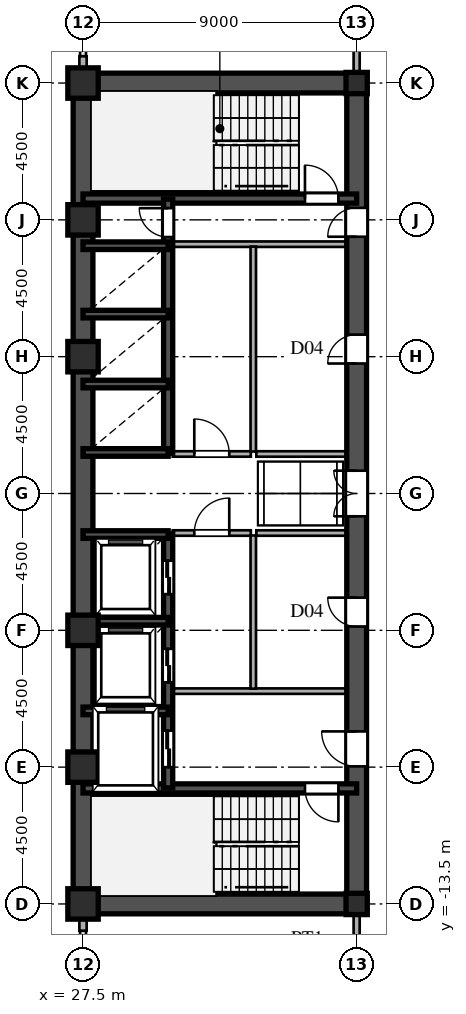
"""IFC4 building model, lengths in metres.
Left out: names, types, materials, properties, quantities, classifications, styles, units other than length and angle.
Written with IfcOpenShell. Run it as: python <this file> out.ifc"""

import sys

from ifc_helpers import new_model, si_unit, direction, frame, frame_2d, origin, origin_2d, place, context, subcontext, project, spatial, rectangle, hollow_rectangle, i_section, extrude, source, transform, mapped, element, fill, save


model = new_model("IFC4")
c1 = context("Model", 3, precision=1e-05, world=origin(), true_north=direction((0.0, 1.0)))
c2 = subcontext(c1, "Body", "Model", "MODEL_VIEW")
j1 = project(units=[si_unit("LENGTHUNIT", "METRE"), si_unit("PLANEANGLEUNIT", "RADIAN")], contexts=[c1])
p1 = place(None, origin())
s1 = spatial("IfcSite", under=j1, at=p1, CompositionType="ELEMENT")
p2 = place(p1, origin())
s2 = spatial("IfcBuilding", under=s1, at=p2, CompositionType="ELEMENT")
p3 = place(p2, frame((0.0, 0.0, 128.4)))
s3 = spatial("IfcBuildingStorey", under=s2, at=p3, CompositionType="ELEMENT", Elevation=128.4)
m1 = source(origin(), c2, "Body", "SweptSolid", [
    extrude(hollow_rectangle(XDim=1.0, YDim=1.0, WallThickness=0.042, at=origin_2d()), origin(), (0.0, 0.0, 1.0), 3.6),
])
for number, where, z_axis, x_axis in (
    (1, (27.5, -13.5, 0.0), (0.0, 0.0, 1.0), (1.0, 0.0, 0.0)),
    (2, (27.5, -9.0, 0.0), (0.0, 0.0, 1.0), (1.0, 0.0, 0.0)),
    (3, (27.5, -4.5, 0.0), (0.0, 0.0, 1.0), (1.0, 0.0, 0.0)),
    (4, (27.5, 4.5, 0.0), (0.0, 0.0, 1.0), (1.0, 0.0, 0.0)),
    (5, (27.5, 9.0, 0.0), (0.0, 0.0, 1.0), (1.0, 0.0, 0.0)),
    (6, (27.5, 13.5, 0.0), (0.0, 0.0, 1.0), (1.0, 0.0, 0.0)),
):
    element("IfcColumn", number, at=place(p3, frame(where, z_axis=z_axis, x_axis=x_axis)), inside=s3, PredefinedType="COLUMN", context=c2, shape_type="MappedRepresentation", body=[
        mapped(m1, transform((0.0, 0.0, 0.0), scale=1.0)),
    ])
m2 = source(origin(), c2, "Body", "SweptSolid", [
    extrude(i_section(OverallWidth=0.7, OverallDepth=0.7, WebThickness=0.028, FlangeThickness=0.045, at=origin_2d()), origin(), (0.0, 0.0, 1.0), 3.6),
])
for number, where, z_axis, x_axis in (
    (7, (36.5, -13.5, 0.0), (0.0, 0.0, 1.0), (1.0, 0.0, 0.0)),
    (8, (36.5, 13.5, 0.0), (0.0, 0.0, 1.0), (1.0, 0.0, 0.0)),
):
    element("IfcColumn", number, at=place(p3, frame(where, z_axis=z_axis, x_axis=x_axis)), inside=s3, PredefinedType="COLUMN", context=c2, shape_type="MappedRepresentation", body=[
        mapped(m2, transform((0.0, 0.0, 0.0), scale=1.0)),
    ])
for number, where, z_axis, x_axis in (
    (9, (27.5, -14.38, 0.0), (0.0, 0.0, 1.0), (0.0, 1.0, 0.0)),
    (10, (27.5, 13.83, 0.0), (0.0, 0.0, 1.0), (0.0, 1.0, 0.0)),
):
    element("IfcWall", number, at=place(p3, frame(where, z_axis=z_axis, x_axis=x_axis)), inside=s3, PredefinedType="SOLIDWALL", context=c2, shape_type="SweptSolid", body=[
        extrude(rectangle(XDim=0.55, YDim=0.24, at=frame_2d((0.275, 0.0))), origin(), (0.0, 0.0, 1.0), 2.88),
    ])
for number, where, z_axis, x_axis in (
    (11, (27.5, -13.5, 0.0), (0.0, 0.0, 1.0), (0.0, 1.0, 0.0)),
    (12, (27.5, 1.3, 0.0), (0.0, 0.0, 1.0), (0.0, 1.0, 0.0)),
):
    element("IfcWall", number, at=place(p3, frame(where, z_axis=z_axis, x_axis=x_axis)), inside=s3, PredefinedType="SHEAR", context=c2, shape_type="SweptSolid", body=[
        extrude(rectangle(XDim=12.2, YDim=0.65, at=frame_2d((6.1, 0.0))), origin(), (0.0, 0.0, 1.0), 3.38),
    ])
p4 = place(p3, frame((27.5, -1.3, 0.0), z_axis=(0.0, 0.0, 1.0), x_axis=(0.0, 1.0, 0.0)))
e13 = element("IfcWall", 13, at=p4, inside=s3, PredefinedType="SHEAR", context=c2, shape_type="SweptSolid", body=[
    extrude(rectangle(XDim=2.6, YDim=0.65, at=frame_2d((1.3, 0.0))), origin(), (0.0, 0.0, 1.0), 3.38),
])
for number, where, z_axis, x_axis in (
    (14, (27.5, -13.5, 0.0), (0.0, 0.0, 1.0), (1.0, 0.0, 0.0)),
    (15, (27.5, 13.5, 0.0), (0.0, 0.0, 1.0), (1.0, 0.0, 0.0)),
):
    element("IfcWall", number, at=place(p3, frame(where, z_axis=z_axis, x_axis=x_axis)), inside=s3, PredefinedType="SHEAR", context=c2, shape_type="SweptSolid", body=[
        extrude(rectangle(XDim=9.0, YDim=0.65, at=frame_2d((4.5, 0.0))), origin(), (0.0, 0.0, 1.0), 3.38),
    ])
p5 = place(p3, frame((36.5, -13.65, 0.0), z_axis=(0.0, 0.0, 1.0), x_axis=(0.0, 1.0, 0.0)))
e16 = element("IfcWall", 16, at=p5, inside=s3, PredefinedType="SHEAR", context=c2, shape_type="SweptSolid", body=[
    extrude(rectangle(XDim=7.15, YDim=0.65, at=frame_2d((3.575, 0.0))), origin(), (0.0, 0.0, 1.0), 3.38),
])
p6 = place(p5, frame((4.675, 0.0, 0.0)))
e17 = element("IfcOpeningElement", 17, at=p6, cuts=e16, PredefinedType="OPENING", context=c2, shape_type="SweptSolid", body=[
    extrude(rectangle(XDim=1.15, YDim=2.2, at=frame_2d((0.575, 1.1))), frame((0.0, 0.335, 0.0), z_axis=(0.0, -1.0, 0.0), x_axis=(1.0, 0.0, 0.0)), (0.0, 0.0, 1.0), 0.67),
])
p7 = place(p3, frame((36.5, -1.3, 0.0), z_axis=(0.0, 0.0, 1.0), x_axis=(0.0, 1.0, 0.0)))
e18 = element("IfcWall", 18, at=p7, inside=s3, PredefinedType="SHEAR", context=c2, shape_type="SweptSolid", body=[
    extrude(rectangle(XDim=2.6, YDim=0.65, at=frame_2d((1.3, 0.0))), origin(), (0.0, 0.0, 1.0), 3.38),
])
p8 = place(p7, frame((0.55, 0.0, 0.0)))
e19 = element("IfcOpeningElement", 19, at=p8, cuts=e18, PredefinedType="OPENING", context=c2, shape_type="SweptSolid", body=[
    extrude(rectangle(XDim=1.5, YDim=2.3, at=frame_2d((0.75, 1.15))), frame((0.0, 0.335, 0.0), z_axis=(0.0, -1.0, 0.0), x_axis=(1.0, 0.0, 0.0)), (0.0, 0.0, 1.0), 0.67),
])
p9 = place(p3, frame((36.5, 8.2, 0.0), z_axis=(0.0, 0.0, 1.0), x_axis=(0.0, 1.0, 0.0)))
e20 = element("IfcWall", 20, at=p9, inside=s3, PredefinedType="SHEAR", context=c2, shape_type="SweptSolid", body=[
    extrude(rectangle(XDim=5.45, YDim=0.65, at=frame_2d((2.725, 0.0))), origin(), (0.0, 0.0, 1.0), 3.38),
])
p10 = place(p9, frame((0.245, 0.0, 0.0)))
e21 = element("IfcOpeningElement", 21, at=p10, cuts=e20, PredefinedType="OPENING", context=c2, shape_type="SweptSolid", body=[
    extrude(rectangle(XDim=0.95, YDim=2.15, at=frame_2d((0.475, 1.075))), frame((0.0, 0.335, 0.0), z_axis=(0.0, -1.0, 0.0), x_axis=(1.0, 0.0, 0.0)), (0.0, 0.0, 1.0), 0.67),
])
p11 = place(p3, frame((36.5, -6.5, 0.0), z_axis=(0.0, 0.0, 1.0), x_axis=(0.0, 1.0, 0.0)))
e22 = element("IfcWall", 22, at=p11, inside=s3, PredefinedType="SHEAR", context=c2, shape_type="SweptSolid", body=[
    extrude(rectangle(XDim=5.2, YDim=0.65, at=frame_2d((2.6, 0.0))), origin(), (0.0, 0.0, 1.0), 3.38),
])
p12 = place(p11, frame((2.125, 0.0, 0.0)))
e23 = element("IfcOpeningElement", 23, at=p12, cuts=e22, PredefinedType="OPENING", context=c2, shape_type="SweptSolid", body=[
    extrude(rectangle(XDim=0.95, YDim=2.15, at=frame_2d((0.475, 1.075))), frame((0.0, 0.335, 0.0), z_axis=(0.0, -1.0, 0.0), x_axis=(1.0, 0.0, 0.0)), (0.0, 0.0, 1.0), 0.67),
])
p13 = place(p3, frame((36.5, 1.3, 0.0), z_axis=(0.0, 0.0, 1.0), x_axis=(0.0, 1.0, 0.0)))
e24 = element("IfcWall", 24, at=p13, inside=s3, PredefinedType="SHEAR", context=c2, shape_type="SweptSolid", body=[
    extrude(rectangle(XDim=6.9, YDim=0.65, at=frame_2d((3.45, 0.0))), origin(), (0.0, 0.0, 1.0), 3.38),
])
p14 = place(p13, frame((2.975, 0.0, 0.0)))
e25 = element("IfcOpeningElement", 25, at=p14, cuts=e24, PredefinedType="OPENING", context=c2, shape_type="SweptSolid", body=[
    extrude(rectangle(XDim=0.95, YDim=2.15, at=frame_2d((0.475, 1.075))), frame((0.0, 0.335, 0.0), z_axis=(0.0, -1.0, 0.0), x_axis=(1.0, 0.0, 0.0)), (0.0, 0.0, 1.0), 0.67),
])
p15 = place(p3, frame((27.5, -9.7, 0.0), z_axis=(0.0, 0.0, 1.0), x_axis=(1.0, 0.0, 0.0)))
e26 = element("IfcWall", 26, at=p15, inside=s3, PredefinedType="SHEAR", context=c2, shape_type="SweptSolid", body=[
    extrude(rectangle(XDim=9.0, YDim=0.3, at=frame_2d((4.5, 0.0))), origin(), (0.0, 0.0, 1.0), 3.38),
])
p16 = place(p15, frame((7.3, 0.0, 0.0)))
e27 = element("IfcOpeningElement", 27, at=p16, cuts=e26, PredefinedType="OPENING", context=c2, shape_type="SweptSolid", body=[
    extrude(rectangle(XDim=1.1, YDim=2.2, at=frame_2d((0.55, 1.1))), frame((0.0, 0.16, 0.0), z_axis=(0.0, -1.0, 0.0), x_axis=(1.0, 0.0, 0.0)), (0.0, 0.0, 1.0), 0.32),
])
p17 = place(p3, frame((27.5, 9.7, 0.0), z_axis=(0.0, 0.0, 1.0), x_axis=(1.0, 0.0, 0.0)))
e28 = element("IfcWall", 28, at=p17, inside=s3, PredefinedType="SHEAR", context=c2, shape_type="SweptSolid", body=[
    extrude(rectangle(XDim=9.0, YDim=0.3, at=frame_2d((4.5, 0.0))), origin(), (0.0, 0.0, 1.0), 3.38),
])
p18 = place(p17, frame((7.3, 0.0, 0.0)))
e29 = element("IfcOpeningElement", 29, at=p18, cuts=e28, PredefinedType="OPENING", context=c2, shape_type="SweptSolid", body=[
    extrude(rectangle(XDim=1.1, YDim=2.2, at=frame_2d((0.55, 1.1))), frame((0.0, 0.16, 0.0), z_axis=(0.0, -1.0, 0.0), x_axis=(1.0, 0.0, 0.0)), (0.0, 0.0, 1.0), 0.32),
])
for number, where, z_axis, x_axis in (
    (30, (27.5, -7.15, 0.0), (0.0, 0.0, 1.0), (1.0, 0.0, 0.0)),
    (31, (27.5, -4.2, 0.0), (0.0, 0.0, 1.0), (1.0, 0.0, 0.0)),
    (32, (27.5, -1.35, 0.0), (0.0, 0.0, 1.0), (1.0, 0.0, 0.0)),
    (33, (27.5, 1.35, 0.0), (0.0, 0.0, 1.0), (1.0, 0.0, 0.0)),
    (34, (27.5, 3.6, 0.0), (0.0, 0.0, 1.0), (1.0, 0.0, 0.0)),
    (35, (27.5, 5.9, 0.0), (0.0, 0.0, 1.0), (1.0, 0.0, 0.0)),
    (36, (27.5, 8.15, 0.0), (0.0, 0.0, 1.0), (1.0, 0.0, 0.0)),
):
    element("IfcWall", number, at=place(p3, frame(where, z_axis=z_axis, x_axis=x_axis)), inside=s3, PredefinedType="SHEAR", context=c2, shape_type="SweptSolid", body=[
        extrude(rectangle(XDim=2.8, YDim=0.25, at=frame_2d((1.4, 0.0))), origin(), (0.0, 0.0, 1.0), 3.38),
    ])
p19 = place(p3, frame((30.3, -9.68, 0.0), z_axis=(0.0, 0.0, 1.0), x_axis=(0.0, 1.0, 0.0)))
e37 = element("IfcWall", 37, at=p19, inside=s3, PredefinedType="SHEAR", context=c2, shape_type="SweptSolid", body=[
    extrude(rectangle(XDim=2.56, YDim=0.3, at=frame_2d((1.28, 0.0))), origin(), (0.0, 0.0, 1.0), 3.38),
])
p20 = place(p19, frame((0.68, 0.0, 0.0)))
e38 = element("IfcOpeningElement", 38, at=p20, cuts=e37, PredefinedType="OPENING", context=c2, shape_type="SweptSolid", body=[
    extrude(rectangle(XDim=1.2, YDim=2.25, at=frame_2d((0.6, 1.125))), frame((0.0, 0.16, 0.0), z_axis=(0.0, -1.0, 0.0), x_axis=(1.0, 0.0, 0.0)), (0.0, 0.0, 1.0), 0.32),
])
p21 = place(p3, frame((30.3, -7.12, 0.0), z_axis=(0.0, 0.0, 1.0), x_axis=(0.0, 1.0, 0.0)))
e39 = element("IfcWall", 39, at=p21, inside=s3, PredefinedType="SHEAR", context=c2, shape_type="SweptSolid", body=[
    extrude(rectangle(XDim=2.92, YDim=0.3, at=frame_2d((1.46, 0.0))), origin(), (0.0, 0.0, 1.0), 3.38),
])
p22 = place(p21, frame((0.91, 0.0, 0.0)))
e40 = element("IfcOpeningElement", 40, at=p22, cuts=e39, PredefinedType="OPENING", context=c2, shape_type="SweptSolid", body=[
    extrude(rectangle(XDim=1.1, YDim=2.2, at=frame_2d((0.55, 1.1))), frame((0.0, 0.16, 0.0), z_axis=(0.0, -1.0, 0.0), x_axis=(1.0, 0.0, 0.0)), (0.0, 0.0, 1.0), 0.32),
])
p23 = place(p3, frame((30.3, -4.2, 0.0), z_axis=(0.0, 0.0, 1.0), x_axis=(0.0, 1.0, 0.0)))
e41 = element("IfcWall", 41, at=p23, inside=s3, PredefinedType="SHEAR", context=c2, shape_type="SweptSolid", body=[
    extrude(rectangle(XDim=2.88, YDim=0.3, at=frame_2d((1.44, 0.0))), origin(), (0.0, 0.0, 1.0), 3.38),
])
p24 = place(p23, frame((0.89, 0.0, 0.0)))
e42 = element("IfcOpeningElement", 42, at=p24, cuts=e41, PredefinedType="OPENING", context=c2, shape_type="SweptSolid", body=[
    extrude(rectangle(XDim=1.1, YDim=2.2, at=frame_2d((0.55, 1.1))), frame((0.0, 0.16, 0.0), z_axis=(0.0, -1.0, 0.0), x_axis=(1.0, 0.0, 0.0)), (0.0, 0.0, 1.0), 0.32),
])
p25 = place(p3, frame((30.3, 1.32, 0.0), z_axis=(0.0, 0.0, 1.0), x_axis=(0.0, 1.0, 0.0)))
e43 = element("IfcWall", 43, at=p25, inside=s3, PredefinedType="SHEAR", context=c2, shape_type="SweptSolid", body=[
    extrude(rectangle(XDim=2.28, YDim=0.3, at=frame_2d((1.14, 0.0))), origin(), (0.0, 0.0, 1.0), 3.38),
])
p26 = place(p3, frame((30.3, 3.6, 0.0), z_axis=(0.0, 0.0, 1.0), x_axis=(0.0, 1.0, 0.0)))
e44 = element("IfcWall", 44, at=p26, inside=s3, PredefinedType="SHEAR", context=c2, shape_type="SweptSolid", body=[
    extrude(rectangle(XDim=2.3, YDim=0.3, at=frame_2d((1.15, 0.0))), origin(), (0.0, 0.0, 1.0), 3.38),
])
p27 = place(p3, frame((30.3, 5.9, 0.0), z_axis=(0.0, 0.0, 1.0), x_axis=(0.0, 1.0, 0.0)))
e45 = element("IfcWall", 45, at=p27, inside=s3, PredefinedType="SHEAR", context=c2, shape_type="SweptSolid", body=[
    extrude(rectangle(XDim=2.25, YDim=0.3, at=frame_2d((1.125, 0.0))), origin(), (0.0, 0.0, 1.0), 3.38),
])
p28 = place(p3, frame((30.3, 8.15, 0.0), z_axis=(0.0, 0.0, 1.0), x_axis=(0.0, 1.0, 0.0)))
e46 = element("IfcWall", 46, at=p28, inside=s3, PredefinedType="SHEAR", context=c2, shape_type="SweptSolid", body=[
    extrude(rectangle(XDim=1.53, YDim=0.3, at=frame_2d((0.765, 0.0))), origin(), (0.0, 0.0, 1.0), 3.38),
])
p29 = place(p28, frame((0.285, 0.0, 0.0)))
e47 = element("IfcOpeningElement", 47, at=p29, cuts=e46, PredefinedType="OPENING", context=c2, shape_type="SweptSolid", body=[
    extrude(rectangle(XDim=0.95, YDim=2.15, at=frame_2d((0.475, 1.075))), frame((0.0, 0.16, 0.0), z_axis=(0.0, -1.0, 0.0), x_axis=(1.0, 0.0, 0.0)), (0.0, 0.0, 1.0), 0.32),
])
for number, where, z_axis, x_axis in (
    (48, (30.45, -6.5, 0.0), (0.0, 0.0, 1.0), (1.0, 0.0, 0.0)),
    (49, (30.45, 8.2, 0.0), (0.0, 0.0, 1.0), (1.0, 0.0, 0.0)),
):
    element("IfcWall", number, at=place(p3, frame(where, z_axis=z_axis, x_axis=x_axis)), inside=s3, PredefinedType="PARTITIONING", context=c2, shape_type="SweptSolid", body=[
        extrude(rectangle(XDim=5.7, YDim=0.18, at=frame_2d((2.85, 0.0))), origin(), (0.0, 0.0, 1.0), 3.38),
    ])
p30 = place(p3, frame((33.1, -6.42, 0.0), z_axis=(0.0, 0.0, 1.0), x_axis=(0.0, 1.0, 0.0)))
e50 = element("IfcWall", 50, at=p30, inside=s3, PredefinedType="PARTITIONING", context=c2, shape_type="SweptSolid", body=[
    extrude(rectangle(XDim=5.04, YDim=0.18, at=frame_2d((2.52, 0.0))), origin(), (0.0, 0.0, 1.0), 3.38),
])
p31 = place(p3, frame((33.1, 1.38, 0.0), z_axis=(0.0, 0.0, 1.0), x_axis=(0.0, 1.0, 0.0)))
e51 = element("IfcWall", 51, at=p31, inside=s3, PredefinedType="PARTITIONING", context=c2, shape_type="SweptSolid", body=[
    extrude(rectangle(XDim=6.74, YDim=0.18, at=frame_2d((3.37, 0.0))), origin(), (0.0, 0.0, 1.0), 3.38),
])
p32 = place(p3, frame((30.45, -1.3, 0.0), z_axis=(0.0, 0.0, 1.0), x_axis=(1.0, 0.0, 0.0)))
e52 = element("IfcWall", 52, at=p32, inside=s3, PredefinedType="PARTITIONING", context=c2, shape_type="SweptSolid", body=[
    extrude(rectangle(XDim=2.57, YDim=0.18, at=frame_2d((1.285, 0.0))), origin(), (0.0, 0.0, 1.0), 3.38),
])
p33 = place(p32, frame((0.71, 0.0, 0.0)))
e53 = element("IfcOpeningElement", 53, at=p33, cuts=e52, PredefinedType="OPENING", context=c2, shape_type="SweptSolid", body=[
    extrude(rectangle(XDim=1.15, YDim=2.2, at=frame_2d((0.575, 1.1))), frame((0.0, 0.1, 0.0), z_axis=(0.0, -1.0, 0.0), x_axis=(1.0, 0.0, 0.0)), (0.0, 0.0, 1.0), 0.2),
])
p34 = place(p3, frame((30.45, 1.3, 0.0), z_axis=(0.0, 0.0, 1.0), x_axis=(1.0, 0.0, 0.0)))
e54 = element("IfcWall", 54, at=p34, inside=s3, PredefinedType="PARTITIONING", context=c2, shape_type="SweptSolid", body=[
    extrude(rectangle(XDim=2.57, YDim=0.18, at=frame_2d((1.285, 0.0))), origin(), (0.0, 0.0, 1.0), 3.38),
])
p35 = place(p34, frame((0.71, 0.0, 0.0)))
e55 = element("IfcOpeningElement", 55, at=p35, cuts=e54, PredefinedType="OPENING", context=c2, shape_type="SweptSolid", body=[
    extrude(rectangle(XDim=1.15, YDim=2.2, at=frame_2d((0.575, 1.1))), frame((0.0, 0.1, 0.0), z_axis=(0.0, -1.0, 0.0), x_axis=(1.0, 0.0, 0.0)), (0.0, 0.0, 1.0), 0.2),
])
for number, where, z_axis, x_axis in (
    (56, (33.2, -1.3, 0.0), (0.0, 0.0, 1.0), (1.0, 0.0, 0.0)),
    (57, (33.2, 1.3, 0.0), (0.0, 0.0, 1.0), (1.0, 0.0, 0.0)),
):
    element("IfcWall", number, at=place(p3, frame(where, z_axis=z_axis, x_axis=x_axis)), inside=s3, PredefinedType="PARTITIONING", context=c2, shape_type="SweptSolid", body=[
        extrude(rectangle(XDim=2.95, YDim=0.18, at=frame_2d((1.475, 0.0))), origin(), (0.0, 0.0, 1.0), 3.38),
    ])
for number, where, z_axis, x_axis in (
    (58, (36.5, -15.515, 0.0), (0.0, 0.0, 1.0), (0.0, 1.0, 0.0)),
    (59, (36.5, 13.83, 0.0), (0.0, 0.0, 1.0), (0.0, 1.0, 0.0)),
):
    element("IfcWall", number, at=place(p3, frame(where, z_axis=z_axis, x_axis=x_axis)), inside=s3, PredefinedType="PARTITIONING", context=c2, shape_type="SweptSolid", body=[
        extrude(rectangle(XDim=1.685, YDim=0.2, at=frame_2d((0.842, 0.0))), origin(), (0.0, 0.0, 1.0), 2.78),
    ])
m3 = source(origin(), c2, "Body", "SweptSolid", [
    extrude(rectangle(XDim=1.15, YDim=2.2, at=frame_2d((0.575, 1.1))), frame((0.0, 0.025, 0.0), z_axis=(0.0, -1.0, 0.0), x_axis=(1.0, 0.0, 0.0)), (0.0, 0.0, 1.0), 0.05),
])
p36 = place(p6, origin())
e60 = element("IfcDoor", 60, at=p36, inside=s3, OperationType="SINGLE_SWING_RIGHT", PredefinedType="DOOR", context=c2, shape_type="MappedRepresentation", body=[
    mapped(m3, transform((0.0, 0.0, 0.0), scale=1.0)),
])
fill(e17, e60)
m4 = source(origin(), c2, "Body", "SweptSolid", [
    extrude(rectangle(XDim=1.5, YDim=2.3, at=frame_2d((0.75, 1.15))), frame((0.0, 0.025, 0.0), z_axis=(0.0, -1.0, 0.0), x_axis=(1.0, 0.0, 0.0)), (0.0, 0.0, 1.0), 0.05),
])
p37 = place(p8, origin())
e61 = element("IfcDoor", 61, at=p37, inside=s3, OperationType="DOUBLE_SWING_LEFT", PredefinedType="DOOR", context=c2, shape_type="MappedRepresentation", body=[
    mapped(m4, transform((0.0, 0.0, 0.0), scale=1.0)),
])
fill(e19, e61)
m5 = source(origin(), c2, "Body", "SweptSolid", [
    extrude(rectangle(XDim=0.95, YDim=2.15, at=frame_2d((0.475, 1.075))), frame((0.0, 0.025, 0.0), z_axis=(0.0, -1.0, 0.0), x_axis=(1.0, 0.0, 0.0)), (0.0, 0.0, 1.0), 0.05),
])
p38 = place(p10, origin())
e62 = element("IfcDoor", 62, at=p38, inside=s3, OperationType="SINGLE_SWING_LEFT", PredefinedType="DOOR", context=c2, shape_type="MappedRepresentation", body=[
    mapped(m5, transform((0.0, 0.0, 0.0), scale=1.0)),
])
fill(e21, e62)
p39 = place(p12, origin())
e63 = element("IfcDoor", 63, at=p39, inside=s3, OperationType="SINGLE_SWING_RIGHT", PredefinedType="DOOR", context=c2, shape_type="MappedRepresentation", body=[
    mapped(m5, transform((0.0, 0.0, 0.0), scale=1.0)),
])
fill(e23, e63)
p40 = place(p14, origin())
e64 = element("IfcDoor", 64, at=p40, inside=s3, OperationType="SINGLE_SWING_LEFT", PredefinedType="DOOR", context=c2, shape_type="MappedRepresentation", body=[
    mapped(m5, transform((0.0, 0.0, 0.0), scale=1.0)),
])
fill(e25, e64)
m6 = source(origin(), c2, "Body", "SweptSolid", [
    extrude(rectangle(XDim=1.1, YDim=2.2, at=frame_2d((0.55, 1.1))), frame((0.0, 0.025, 0.0), z_axis=(0.0, -1.0, 0.0), x_axis=(1.0, 0.0, 0.0)), (0.0, 0.0, 1.0), 0.05),
])
p41 = place(p16, frame((1.1, 0.0, 0.0), z_axis=(0.0, 0.0, 1.0), x_axis=(-1.0, 0.0, 0.0)))
e65 = element("IfcDoor", 65, at=p41, inside=s3, OperationType="SINGLE_SWING_RIGHT", PredefinedType="DOOR", context=c2, shape_type="MappedRepresentation", body=[
    mapped(m6, transform((0.0, 0.0, 0.0), scale=1.0)),
])
fill(e27, e65)
p42 = place(p18, origin())
e66 = element("IfcDoor", 66, at=p42, inside=s3, OperationType="SINGLE_SWING_LEFT", PredefinedType="DOOR", context=c2, shape_type="MappedRepresentation", body=[
    mapped(m6, transform((0.0, 0.0, 0.0), scale=1.0)),
])
fill(e29, e66)
m7 = source(origin(), c2, "Body", "SweptSolid", [
    extrude(rectangle(XDim=1.2, YDim=2.25, at=frame_2d((0.6, 1.125))), frame((0.0, 0.025, 0.0), z_axis=(0.0, -1.0, 0.0), x_axis=(1.0, 0.0, 0.0)), (0.0, 0.0, 1.0), 0.05),
])
p43 = place(p20, origin())
e67 = element("IfcDoor", 67, at=p43, inside=s3, OperationType="DOUBLE_DOOR_SLIDING", PredefinedType="DOOR", context=c2, shape_type="MappedRepresentation", body=[
    mapped(m7, transform((0.0, 0.0, 0.0), scale=1.0)),
])
fill(e38, e67)
m8 = source(origin(), c2, "Body", "SweptSolid", [
    extrude(rectangle(XDim=1.1, YDim=2.2, at=frame_2d((0.55, 1.1))), frame((0.0, 0.025, 0.0), z_axis=(0.0, -1.0, 0.0), x_axis=(1.0, 0.0, 0.0)), (0.0, 0.0, 1.0), 0.05),
])
p44 = place(p22, origin())
e68 = element("IfcDoor", 68, at=p44, inside=s3, OperationType="DOUBLE_DOOR_SLIDING", PredefinedType="DOOR", context=c2, shape_type="MappedRepresentation", body=[
    mapped(m8, transform((0.0, 0.0, 0.0), scale=1.0)),
])
fill(e40, e68)
p45 = place(p24, origin())
e69 = element("IfcDoor", 69, at=p45, inside=s3, OperationType="DOUBLE_DOOR_SLIDING", PredefinedType="DOOR", context=c2, shape_type="MappedRepresentation", body=[
    mapped(m8, transform((0.0, 0.0, 0.0), scale=1.0)),
])
fill(e42, e69)
p46 = place(p29, origin())
e70 = element("IfcDoor", 70, at=p46, inside=s3, OperationType="SINGLE_SWING_RIGHT", PredefinedType="DOOR", context=c2, shape_type="MappedRepresentation", body=[
    mapped(m5, transform((0.0, 0.0, 0.0), scale=1.0)),
])
fill(e47, e70)
p47 = place(p33, origin())
e71 = element("IfcDoor", 71, at=p47, inside=s3, OperationType="SINGLE_SWING_RIGHT", PredefinedType="DOOR", context=c2, shape_type="MappedRepresentation", body=[
    mapped(m3, transform((0.0, 0.0, 0.0), scale=1.0)),
])
fill(e53, e71)
p48 = place(p35, origin())
e72 = element("IfcDoor", 72, at=p48, inside=s3, OperationType="SINGLE_SWING_LEFT", PredefinedType="DOOR", context=c2, shape_type="MappedRepresentation", body=[
    mapped(m3, transform((0.0, 0.0, 0.0), scale=1.0)),
])
fill(e55, e72)
save(model, sys.argv[1])
